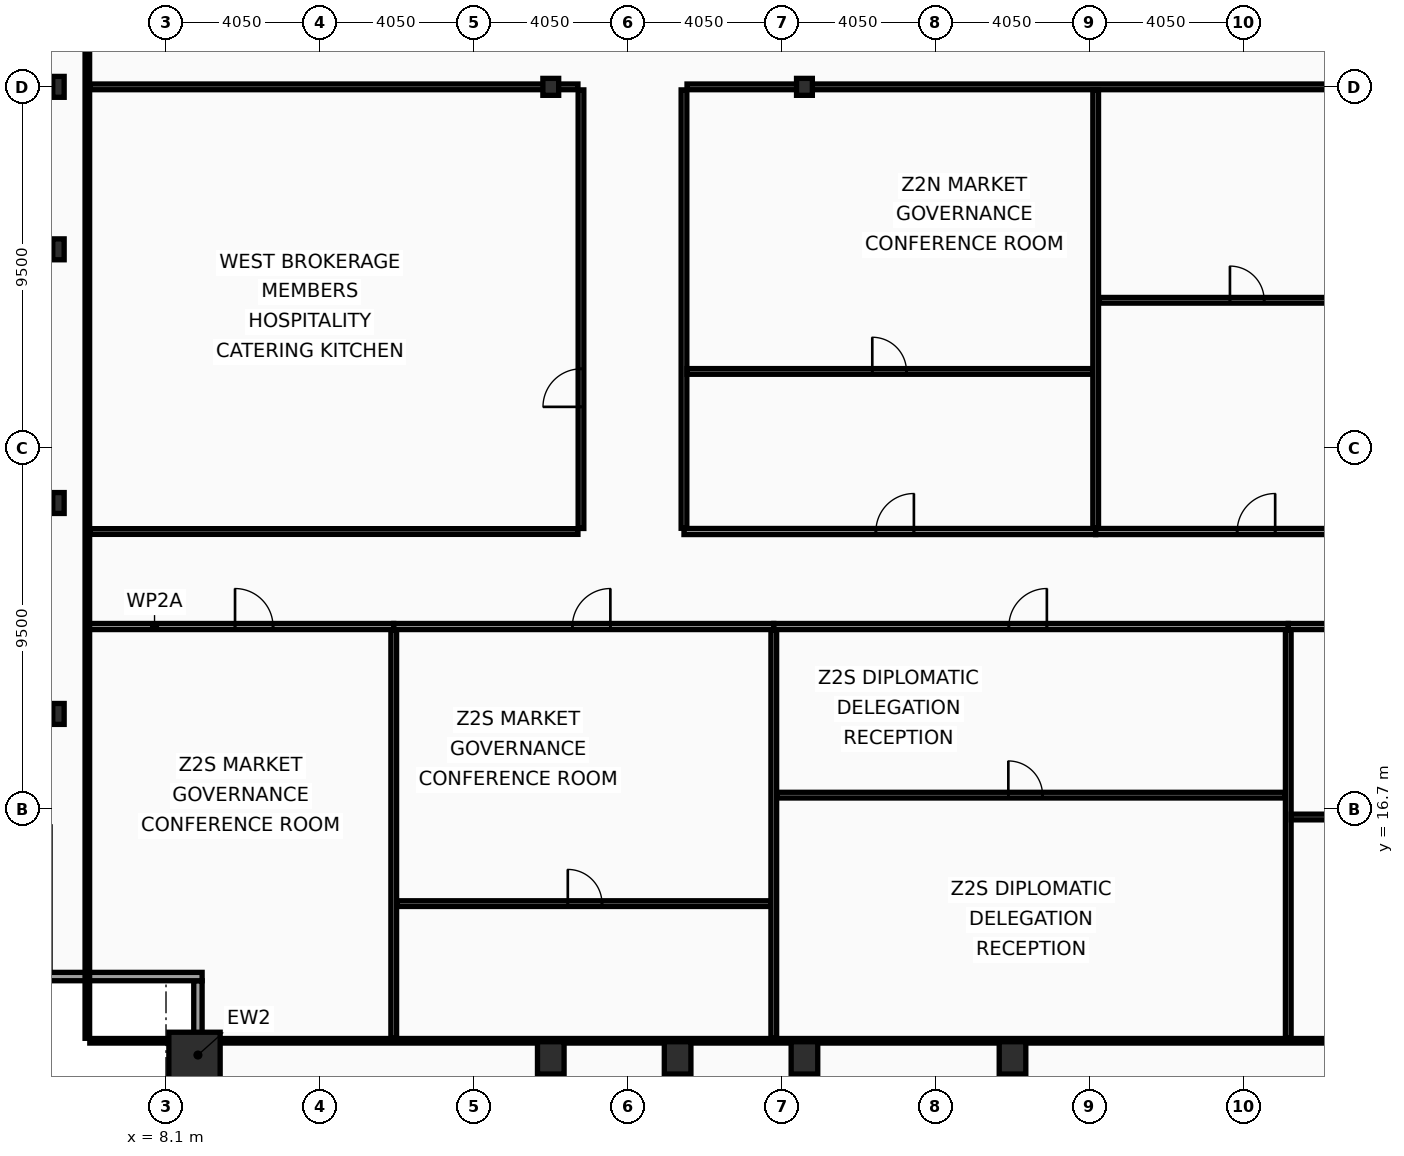
"""IFC4 building model, lengths in metres.
Left out: names, types, materials, properties, quantities, classifications, styles, units other than length and angle.
Written with IfcOpenShell. Run it as: python <this file> out.ifc"""

import sys

from ifc_helpers import new_model, si_unit, direction, frame, frame_2d, origin, origin_2d, place, context, subcontext, project, spatial, rectangle, hollow_rectangle, i_section, extrude, element, fill, save


model = new_model("IFC4")
c1 = context("Model", 3, precision=1e-05, world=origin(), true_north=direction((0.0, 1.0)))
c2 = subcontext(c1, "Body", "Model", "MODEL_VIEW")
j1 = project(units=[si_unit("LENGTHUNIT", "METRE"), si_unit("PLANEANGLEUNIT", "RADIAN")], contexts=[c1])
p1 = place(None, origin())
s1 = spatial("IfcSite", under=j1, at=p1, CompositionType="ELEMENT")
p2 = place(p1, origin())
s2 = spatial("IfcBuilding", under=s1, at=p2, CompositionType="ELEMENT")
p3 = place(p2, frame((0.0, 0.0, 161.4)))
s3 = spatial("IfcBuildingStorey", under=s2, at=p3, CompositionType="ELEMENT", Elevation=161.4)
p4 = place(p3, frame((8.85, 10.15, 0.0), z_axis=(0.0, 0.0, 1.0), x_axis=(1.0, 0.0, 0.0)))
e1 = element("IfcColumn", 1, at=p4, inside=s3, PredefinedType="COLUMN", context=c2, shape_type="SweptSolid", body=[
    extrude(hollow_rectangle(XDim=1.35, YDim=1.35, WallThickness=0.065, at=origin_2d()), origin(), (0.0, 0.0, 1.0), 3.6),
])
for number, where, z_axis, x_axis in (
    (2, (18.225, 10.15, 0.0), (0.0, 0.0, 1.0), (1.0, 0.0, 0.0)),
    (3, (21.562, 10.15, 0.0), (0.0, 0.0, 1.0), (1.0, 0.0, 0.0)),
    (4, (24.9, 10.15, 0.0), (0.0, 0.0, 1.0), (1.0, 0.0, 0.0)),
    (5, (30.375, 10.15, 0.0), (0.0, 0.0, 1.0), (1.0, 0.0, 0.0)),
):
    element("IfcColumn", number, at=place(p3, frame(where, z_axis=z_axis, x_axis=x_axis)), inside=s3, PredefinedType="COLUMN", context=c2, shape_type="SweptSolid", body=[
        extrude(hollow_rectangle(XDim=0.7, YDim=0.85, WallThickness=0.05, at=origin_2d()), origin(), (0.0, 0.0, 1.0), 3.6),
    ])
for number, where, z_axis, x_axis in (
    (6, (5.27, 19.2, 0.0), (0.0, 0.0, 1.0), (1.0, 0.0, 0.0)),
    (7, (5.27, 24.75, 0.0), (0.0, 0.0, 1.0), (1.0, 0.0, 0.0)),
    (8, (5.27, 31.425, 0.0), (0.0, 0.0, 1.0), (1.0, 0.0, 0.0)),
    (9, (5.27, 35.7, 0.0), (0.0, 0.0, 1.0), (1.0, 0.0, 0.0)),
):
    element("IfcColumn", number, at=place(p3, frame(where, z_axis=z_axis, x_axis=x_axis)), inside=s3, PredefinedType="COLUMN", context=c2, shape_type="SweptSolid", body=[
        extrude(i_section(OverallWidth=0.3, OverallDepth=0.55, WebThickness=0.015, FlangeThickness=0.029, at=origin_2d()), origin(), (0.0, 0.0, 1.0), 3.6),
    ])
for number, where, z_axis, x_axis in (
    (10, (18.225, 35.7, 0.0), (0.0, 0.0, 1.0), (1.0, 0.0, 0.0)),
    (11, (24.9, 35.7, 0.0), (0.0, 0.0, 1.0), (1.0, 0.0, 0.0)),
):
    element("IfcColumn", number, at=place(p3, frame(where, z_axis=z_axis, x_axis=x_axis)), inside=s3, PredefinedType="COLUMN", context=c2, shape_type="SweptSolid", body=[
        extrude(i_section(OverallWidth=0.416, OverallDepth=0.446, WebThickness=0.039, FlangeThickness=0.063, at=origin_2d()), origin(), (0.0, 0.0, 1.0), 3.6),
    ])
p5 = place(p3, frame((8.94, 8.27, 0.0), z_axis=(0.0, 0.0, 1.0), x_axis=(0.0, 1.0, 0.0)))
e12 = element("IfcWall", 12, at=p5, inside=s3, PredefinedType="SOLIDWALL", context=c2, shape_type="SweptSolid", body=[
    extrude(rectangle(XDim=3.91, YDim=0.22, at=frame_2d((1.955, 0.0))), origin(), (0.0, 0.0, 1.0), 2.83),
])
p6 = place(p3, frame((9.05, 12.29, 0.0), z_axis=(0.0, 0.0, 1.0), x_axis=(-1.0, 0.0, 0.0)))
e13 = element("IfcWall", 13, at=p6, inside=s3, PredefinedType="SOLIDWALL", context=c2, shape_type="SweptSolid", body=[
    extrude(rectangle(XDim=4.22, YDim=0.22, at=frame_2d((2.11, 0.0))), origin(), (0.0, 0.0, 1.0), 2.83),
])
p7 = place(p3, frame((6.03, 21.5, 0.0), z_axis=(0.0, 0.0, 1.0), x_axis=(1.0, 0.0, 0.0)))
e14 = element("IfcWall", 14, at=p7, inside=s3, PredefinedType="PARTITIONING", context=c2, shape_type="SweptSolid", body=[
    extrude(rectangle(XDim=8.063, YDim=0.16, at=frame_2d((4.031, 0.0))), origin(), (0.0, 0.0, 1.0), 3.44),
])
p8 = place(p7, frame((3.886, 0.0, 0.0)))
e15 = element("IfcOpeningElement", 15, at=p8, cuts=e14, PredefinedType="OPENING", context=c2, shape_type="SweptSolid", body=[
    extrude(rectangle(XDim=1.0, YDim=2.05, at=frame_2d((0.5, 1.025))), frame((0.0, 0.09, 0.0), z_axis=(0.0, -1.0, 0.0), x_axis=(1.0, 0.0, 0.0)), (0.0, 0.0, 1.0), 0.18),
])
p9 = place(p3, frame((14.093, 21.5, 0.0), z_axis=(0.0, 0.0, 1.0), x_axis=(1.0, 0.0, 0.0)))
e16 = element("IfcWall", 16, at=p9, inside=s3, PredefinedType="PARTITIONING", context=c2, shape_type="SweptSolid", body=[
    extrude(rectangle(XDim=10.0, YDim=0.16, at=frame_2d((5.0, 0.0))), origin(), (0.0, 0.0, 1.0), 2.73),
])
p10 = place(p9, frame((4.7, 0.0, 0.0)))
e17 = element("IfcOpeningElement", 17, at=p10, cuts=e16, PredefinedType="OPENING", context=c2, shape_type="SweptSolid", body=[
    extrude(rectangle(XDim=1.0, YDim=2.05, at=frame_2d((0.5, 1.025))), frame((0.0, 0.09, 0.0), z_axis=(0.0, -1.0, 0.0), x_axis=(1.0, 0.0, 0.0)), (0.0, 0.0, 1.0), 0.18),
])
p11 = place(p3, frame((14.093, 10.665, 0.0), z_axis=(0.0, 0.0, 1.0), x_axis=(0.0, 1.0, 0.0)))
e18 = element("IfcWall", 18, at=p11, inside=s3, PredefinedType="PARTITIONING", context=c2, shape_type="SweptSolid", body=[
    extrude(rectangle(XDim=10.75, YDim=0.15, at=frame_2d((5.375, 0.0))), origin(), (0.0, 0.0, 1.0), 2.73),
])
p12 = place(p3, frame((14.173, 14.209, 0.0), z_axis=(0.0, 0.0, 1.0), x_axis=(1.0, 0.0, 0.0)))
e19 = element("IfcWall", 19, at=p12, inside=s3, PredefinedType="PARTITIONING", context=c2, shape_type="SweptSolid", body=[
    extrude(rectangle(XDim=9.84, YDim=0.15, at=frame_2d((4.92, 0.0))), origin(), (0.0, 0.0, 1.0), 2.73),
])
p13 = place(p12, frame((4.5, 0.0, 0.0)))
e20 = element("IfcOpeningElement", 20, at=p13, cuts=e19, PredefinedType="OPENING", context=c2, shape_type="SweptSolid", body=[
    extrude(rectangle(XDim=0.9, YDim=2.05, at=frame_2d((0.45, 1.025))), frame((0.0, 0.085, 0.0), z_axis=(0.0, -1.0, 0.0), x_axis=(1.0, 0.0, 0.0)), (0.0, 0.0, 1.0), 0.17),
])
p14 = place(p3, frame((24.093, 21.5, 0.0), z_axis=(0.0, 0.0, 1.0), x_axis=(1.0, 0.0, 0.0)))
e21 = element("IfcWall", 21, at=p14, inside=s3, PredefinedType="PARTITIONING", context=c2, shape_type="SweptSolid", body=[
    extrude(rectangle(XDim=13.538, YDim=0.16, at=frame_2d((6.769, 0.0))), origin(), (0.0, 0.0, 1.0), 2.73),
])
p15 = place(p14, frame((6.186, 0.0, 0.0)))
e22 = element("IfcOpeningElement", 22, at=p15, cuts=e21, PredefinedType="OPENING", context=c2, shape_type="SweptSolid", body=[
    extrude(rectangle(XDim=1.0, YDim=2.05, at=frame_2d((0.5, 1.025))), frame((0.0, 0.09, 0.0), z_axis=(0.0, -1.0, 0.0), x_axis=(1.0, 0.0, 0.0)), (0.0, 0.0, 1.0), 0.18),
])
p16 = place(p3, frame((24.093, 10.665, 0.0), z_axis=(0.0, 0.0, 1.0), x_axis=(0.0, 1.0, 0.0)))
e23 = element("IfcWall", 23, at=p16, inside=s3, PredefinedType="PARTITIONING", context=c2, shape_type="SweptSolid", body=[
    extrude(rectangle(XDim=10.75, YDim=0.15, at=frame_2d((5.375, 0.0))), origin(), (0.0, 0.0, 1.0), 2.93),
])
p17 = place(p3, frame((24.173, 17.063, 0.0), z_axis=(0.0, 0.0, 1.0), x_axis=(1.0, 0.0, 0.0)))
e24 = element("IfcWall", 24, at=p17, inside=s3, PredefinedType="PARTITIONING", context=c2, shape_type="SweptSolid", body=[
    extrude(rectangle(XDim=13.378, YDim=0.15, at=frame_2d((6.689, 0.0))), origin(), (0.0, 0.0, 1.0), 2.73),
])
p18 = place(p17, frame((6.092, 0.0, 0.0)))
e25 = element("IfcOpeningElement", 25, at=p18, cuts=e24, PredefinedType="OPENING", context=c2, shape_type="SweptSolid", body=[
    extrude(rectangle(XDim=0.9, YDim=2.05, at=frame_2d((0.45, 1.025))), frame((0.0, 0.085, 0.0), z_axis=(0.0, -1.0, 0.0), x_axis=(1.0, 0.0, 0.0)), (0.0, 0.0, 1.0), 0.17),
])
p19 = place(p3, frame((37.631, 21.5, 0.0), z_axis=(0.0, 0.0, 1.0), x_axis=(1.0, 0.0, 0.0)))
e26 = element("IfcWall", 26, at=p19, inside=s3, PredefinedType="PARTITIONING", context=c2, shape_type="SweptSolid", body=[
    extrude(rectangle(XDim=12.0, YDim=0.16, at=frame_2d((6.0, 0.0))), origin(), (0.0, 0.0, 1.0), 2.73),
])
p20 = place(p19, frame((5.54, 0.0, 0.0)))
e27 = element("IfcOpeningElement", 27, at=p20, cuts=e26, PredefinedType="OPENING", context=c2, shape_type="SweptSolid", body=[
    extrude(rectangle(XDim=1.0, YDim=2.05, at=frame_2d((0.5, 1.025))), frame((0.0, 0.09, 0.0), z_axis=(0.0, -1.0, 0.0), x_axis=(1.0, 0.0, 0.0)), (0.0, 0.0, 1.0), 0.18),
])
p21 = place(p3, frame((37.631, 10.665, 0.0), z_axis=(0.0, 0.0, 1.0), x_axis=(0.0, 1.0, 0.0)))
e28 = element("IfcWall", 28, at=p21, inside=s3, PredefinedType="PARTITIONING", context=c2, shape_type="SweptSolid", body=[
    extrude(rectangle(XDim=10.75, YDim=0.15, at=frame_2d((5.375, 0.0))), origin(), (0.0, 0.0, 1.0), 2.93),
])
p22 = place(p3, frame((37.711, 16.488, 0.0), z_axis=(0.0, 0.0, 1.0), x_axis=(1.0, 0.0, 0.0)))
e29 = element("IfcWall", 29, at=p22, inside=s3, PredefinedType="PARTITIONING", context=c2, shape_type="SweptSolid", body=[
    extrude(rectangle(XDim=11.841, YDim=0.15, at=frame_2d((5.92, 0.0))), origin(), (0.0, 0.0, 1.0), 2.73),
])
p23 = place(p22, frame((5.4, 0.0, 0.0)))
e30 = element("IfcOpeningElement", 30, at=p23, cuts=e29, PredefinedType="OPENING", context=c2, shape_type="SweptSolid", body=[
    extrude(rectangle(XDim=0.9, YDim=2.05, at=frame_2d((0.45, 1.025))), frame((0.0, 0.085, 0.0), z_axis=(0.0, -1.0, 0.0), x_axis=(1.0, 0.0, 0.0)), (0.0, 0.0, 1.0), 0.17),
])
p24 = place(p3, frame((19.02, 24.08, 0.0), z_axis=(0.0, 0.0, 1.0), x_axis=(0.0, 1.0, 0.0)))
e31 = element("IfcWall", 31, at=p24, inside=s3, PredefinedType="PARTITIONING", context=c2, shape_type="SweptSolid", body=[
    extrude(rectangle(XDim=11.54, YDim=0.15, at=frame_2d((5.77, 0.0))), origin(), (0.0, 0.0, 1.0), 2.93),
])
p25 = place(p24, frame((3.2, 0.0, 0.0)))
e32 = element("IfcOpeningElement", 32, at=p25, cuts=e31, PredefinedType="OPENING", context=c2, shape_type="SweptSolid", body=[
    extrude(rectangle(XDim=1.0, YDim=2.05, at=frame_2d((0.5, 1.025))), frame((0.0, 0.085, 0.0), z_axis=(0.0, -1.0, 0.0), x_axis=(1.0, 0.0, 0.0)), (0.0, 0.0, 1.0), 0.17),
])
for number, where, z_axis, x_axis in (
    (33, (6.095, 24.0, 0.0), (0.0, 0.0, 1.0), (1.0, 0.0, 0.0)),
    (34, (6.095, 35.7, 0.0), (0.0, 0.0, 1.0), (1.0, 0.0, 0.0)),
):
    element("IfcWall", number, at=place(p3, frame(where, z_axis=z_axis, x_axis=x_axis)), inside=s3, PredefinedType="PARTITIONING", context=c2, shape_type="SweptSolid", body=[
        extrude(rectangle(XDim=12.845, YDim=0.15, at=frame_2d((6.422, 0.0))), origin(), (0.0, 0.0, 1.0), 2.73),
    ])
p26 = place(p3, frame((21.73, 24.085, 0.0), z_axis=(0.0, 0.0, 1.0), x_axis=(0.0, 1.0, 0.0)))
e35 = element("IfcWall", 35, at=p26, inside=s3, PredefinedType="PARTITIONING", context=c2, shape_type="SweptSolid", body=[
    extrude(rectangle(XDim=11.535, YDim=0.15, at=frame_2d((5.768, 0.0))), origin(), (0.0, 0.0, 1.0), 2.93),
])
p27 = place(p3, frame((21.81, 35.7, 0.0), z_axis=(0.0, 0.0, 1.0), x_axis=(1.0, 0.0, 0.0)))
e36 = element("IfcWall", 36, at=p27, inside=s3, PredefinedType="PARTITIONING", context=c2, shape_type="SweptSolid", body=[
    extrude(rectangle(XDim=44.995, YDim=0.15, at=frame_2d((22.498, 0.0))), origin(), (0.0, 0.0, 1.0), 2.73),
])
p28 = place(p3, frame((21.73, 24.0, 0.0), z_axis=(0.0, 0.0, 1.0), x_axis=(1.0, 0.0, 0.0)))
e37 = element("IfcWall", 37, at=p28, inside=s3, PredefinedType="PARTITIONING", context=c2, shape_type="SweptSolid", body=[
    extrude(rectangle(XDim=10.834, YDim=0.16, at=frame_2d((5.417, 0.0))), origin(), (0.0, 0.0, 1.0), 2.73),
])
p29 = place(p28, frame((5.05, 0.0, 0.0)))
e38 = element("IfcOpeningElement", 38, at=p29, cuts=e37, PredefinedType="OPENING", context=c2, shape_type="SweptSolid", body=[
    extrude(rectangle(XDim=1.0, YDim=2.05, at=frame_2d((0.5, 1.025))), frame((0.0, 0.09, 0.0), z_axis=(0.0, -1.0, 0.0), x_axis=(1.0, 0.0, 0.0)), (0.0, 0.0, 1.0), 0.18),
])
p30 = place(p3, frame((21.81, 28.212, 0.0), z_axis=(0.0, 0.0, 1.0), x_axis=(1.0, 0.0, 0.0)))
e39 = element("IfcWall", 39, at=p30, inside=s3, PredefinedType="PARTITIONING", context=c2, shape_type="SweptSolid", body=[
    extrude(rectangle(XDim=10.674, YDim=0.15, at=frame_2d((5.337, 0.0))), origin(), (0.0, 0.0, 1.0), 2.73),
])
p31 = place(p30, frame((4.875, 0.0, 0.0)))
e40 = element("IfcOpeningElement", 40, at=p31, cuts=e39, PredefinedType="OPENING", context=c2, shape_type="SweptSolid", body=[
    extrude(rectangle(XDim=0.9, YDim=2.05, at=frame_2d((0.45, 1.025))), frame((0.0, 0.085, 0.0), z_axis=(0.0, -1.0, 0.0), x_axis=(1.0, 0.0, 0.0)), (0.0, 0.0, 1.0), 0.17),
])
p32 = place(p3, frame((32.564, 24.0, 0.0), z_axis=(0.0, 0.0, 1.0), x_axis=(1.0, 0.0, 0.0)))
e41 = element("IfcWall", 41, at=p32, inside=s3, PredefinedType="PARTITIONING", context=c2, shape_type="SweptSolid", body=[
    extrude(rectangle(XDim=7.674, YDim=0.16, at=frame_2d((3.837, 0.0))), origin(), (0.0, 0.0, 1.0), 3.44),
])
p33 = place(p32, frame((3.723, 0.0, 0.0)))
e42 = element("IfcOpeningElement", 42, at=p33, cuts=e41, PredefinedType="OPENING", context=c2, shape_type="SweptSolid", body=[
    extrude(rectangle(XDim=1.0, YDim=2.05, at=frame_2d((0.5, 1.025))), frame((0.0, 0.09, 0.0), z_axis=(0.0, -1.0, 0.0), x_axis=(1.0, 0.0, 0.0)), (0.0, 0.0, 1.0), 0.18),
])
p34 = place(p3, frame((32.564, 24.085, 0.0), z_axis=(0.0, 0.0, 1.0), x_axis=(0.0, 1.0, 0.0)))
e43 = element("IfcWall", 43, at=p34, inside=s3, PredefinedType="PARTITIONING", context=c2, shape_type="SweptSolid", body=[
    extrude(rectangle(XDim=11.535, YDim=0.15, at=frame_2d((5.768, 0.0))), origin(), (0.0, 0.0, 1.0), 2.93),
])
p35 = place(p3, frame((32.644, 30.084, 0.0), z_axis=(0.0, 0.0, 1.0), x_axis=(1.0, 0.0, 0.0)))
e44 = element("IfcWall", 44, at=p35, inside=s3, PredefinedType="PARTITIONING", context=c2, shape_type="SweptSolid", body=[
    extrude(rectangle(XDim=7.514, YDim=0.15, at=frame_2d((3.757, 0.0))), origin(), (0.0, 0.0, 1.0), 3.44),
])
p36 = place(p35, frame((3.453, 0.0, 0.0)))
e45 = element("IfcOpeningElement", 45, at=p36, cuts=e44, PredefinedType="OPENING", context=c2, shape_type="SweptSolid", body=[
    extrude(rectangle(XDim=0.9, YDim=2.05, at=frame_2d((0.45, 1.025))), frame((0.0, 0.085, 0.0), z_axis=(0.0, -1.0, 0.0), x_axis=(1.0, 0.0, 0.0)), (0.0, 0.0, 1.0), 0.17),
])
p37 = place(p3, frame((6.03, 10.665, 0.0), z_axis=(0.0, 0.0, 1.0), x_axis=(0.0, 1.0, 0.0)))
e46 = element("IfcWall", 46, at=p37, inside=s3, PredefinedType="PARTITIONING", context=c2, shape_type="SweptSolid", body=[
    extrude(rectangle(XDim=42.11, YDim=0.12, at=frame_2d((21.055, 0.0))), origin(), (0.0, 0.0, 1.0), 2.73),
])
p38 = place(p3, frame((6.095, 10.6, 0.0), z_axis=(0.0, 0.0, 1.0), x_axis=(1.0, 0.0, 0.0)))
e47 = element("IfcWall", 47, at=p38, inside=s3, PredefinedType="PARTITIONING", context=c2, shape_type="SweptSolid", body=[
    extrude(rectangle(XDim=60.71, YDim=0.12, at=frame_2d((30.355, 0.0))), origin(), (0.0, 0.0, 1.0), 2.73),
])
p39 = place(p8, origin())
e48 = element("IfcDoor", 48, at=p39, inside=s3, OperationType="SINGLE_SWING_LEFT", PredefinedType="DOOR", context=c2, shape_type="SweptSolid", body=[
    extrude(rectangle(XDim=1.0, YDim=2.05, at=frame_2d((0.5, 1.025))), frame((0.0, 0.025, 0.0), z_axis=(0.0, -1.0, 0.0), x_axis=(1.0, 0.0, 0.0)), (0.0, 0.0, 1.0), 0.05),
])
fill(e15, e48)
p40 = place(p10, origin())
e49 = element("IfcDoor", 49, at=p40, inside=s3, OperationType="SINGLE_SWING_RIGHT", PredefinedType="DOOR", context=c2, shape_type="SweptSolid", body=[
    extrude(rectangle(XDim=1.0, YDim=2.05, at=frame_2d((0.5, 1.025))), frame((0.0, 0.025, 0.0), z_axis=(0.0, -1.0, 0.0), x_axis=(1.0, 0.0, 0.0)), (0.0, 0.0, 1.0), 0.05),
])
fill(e17, e49)
p41 = place(p13, origin())
e50 = element("IfcDoor", 50, at=p41, inside=s3, OperationType="SINGLE_SWING_LEFT", PredefinedType="DOOR", context=c2, shape_type="SweptSolid", body=[
    extrude(rectangle(XDim=0.9, YDim=2.05, at=frame_2d((0.45, 1.025))), frame((0.0, 0.025, 0.0), z_axis=(0.0, -1.0, 0.0), x_axis=(1.0, 0.0, 0.0)), (0.0, 0.0, 1.0), 0.05),
])
fill(e20, e50)
p42 = place(p15, origin())
e51 = element("IfcDoor", 51, at=p42, inside=s3, OperationType="SINGLE_SWING_RIGHT", PredefinedType="DOOR", context=c2, shape_type="SweptSolid", body=[
    extrude(rectangle(XDim=1.0, YDim=2.05, at=frame_2d((0.5, 1.025))), frame((0.0, 0.025, 0.0), z_axis=(0.0, -1.0, 0.0), x_axis=(1.0, 0.0, 0.0)), (0.0, 0.0, 1.0), 0.05),
])
fill(e22, e51)
p43 = place(p18, origin())
e52 = element("IfcDoor", 52, at=p43, inside=s3, OperationType="SINGLE_SWING_LEFT", PredefinedType="DOOR", context=c2, shape_type="SweptSolid", body=[
    extrude(rectangle(XDim=0.9, YDim=2.05, at=frame_2d((0.45, 1.025))), frame((0.0, 0.025, 0.0), z_axis=(0.0, -1.0, 0.0), x_axis=(1.0, 0.0, 0.0)), (0.0, 0.0, 1.0), 0.05),
])
fill(e25, e52)
p44 = place(p25, origin())
e53 = element("IfcDoor", 53, at=p44, inside=s3, OperationType="SINGLE_SWING_LEFT", PredefinedType="DOOR", context=c2, shape_type="SweptSolid", body=[
    extrude(rectangle(XDim=1.0, YDim=2.05, at=frame_2d((0.5, 1.025))), frame((0.0, 0.025, 0.0), z_axis=(0.0, -1.0, 0.0), x_axis=(1.0, 0.0, 0.0)), (0.0, 0.0, 1.0), 0.05),
])
fill(e32, e53)
p45 = place(p29, origin())
e54 = element("IfcDoor", 54, at=p45, inside=s3, OperationType="SINGLE_SWING_RIGHT", PredefinedType="DOOR", context=c2, shape_type="SweptSolid", body=[
    extrude(rectangle(XDim=1.0, YDim=2.05, at=frame_2d((0.5, 1.025))), frame((0.0, 0.025, 0.0), z_axis=(0.0, -1.0, 0.0), x_axis=(1.0, 0.0, 0.0)), (0.0, 0.0, 1.0), 0.05),
])
fill(e38, e54)
p46 = place(p31, origin())
e55 = element("IfcDoor", 55, at=p46, inside=s3, OperationType="SINGLE_SWING_LEFT", PredefinedType="DOOR", context=c2, shape_type="SweptSolid", body=[
    extrude(rectangle(XDim=0.9, YDim=2.05, at=frame_2d((0.45, 1.025))), frame((0.0, 0.025, 0.0), z_axis=(0.0, -1.0, 0.0), x_axis=(1.0, 0.0, 0.0)), (0.0, 0.0, 1.0), 0.05),
])
fill(e40, e55)
p47 = place(p33, origin())
e56 = element("IfcDoor", 56, at=p47, inside=s3, OperationType="SINGLE_SWING_RIGHT", PredefinedType="DOOR", context=c2, shape_type="SweptSolid", body=[
    extrude(rectangle(XDim=1.0, YDim=2.05, at=frame_2d((0.5, 1.025))), frame((0.0, 0.025, 0.0), z_axis=(0.0, -1.0, 0.0), x_axis=(1.0, 0.0, 0.0)), (0.0, 0.0, 1.0), 0.05),
])
fill(e42, e56)
p48 = place(p36, origin())
e57 = element("IfcDoor", 57, at=p48, inside=s3, OperationType="SINGLE_SWING_LEFT", PredefinedType="DOOR", context=c2, shape_type="SweptSolid", body=[
    extrude(rectangle(XDim=0.9, YDim=2.05, at=frame_2d((0.45, 1.025))), frame((0.0, 0.025, 0.0), z_axis=(0.0, -1.0, 0.0), x_axis=(1.0, 0.0, 0.0)), (0.0, 0.0, 1.0), 0.05),
])
fill(e45, e57)
save(model, sys.argv[1])
